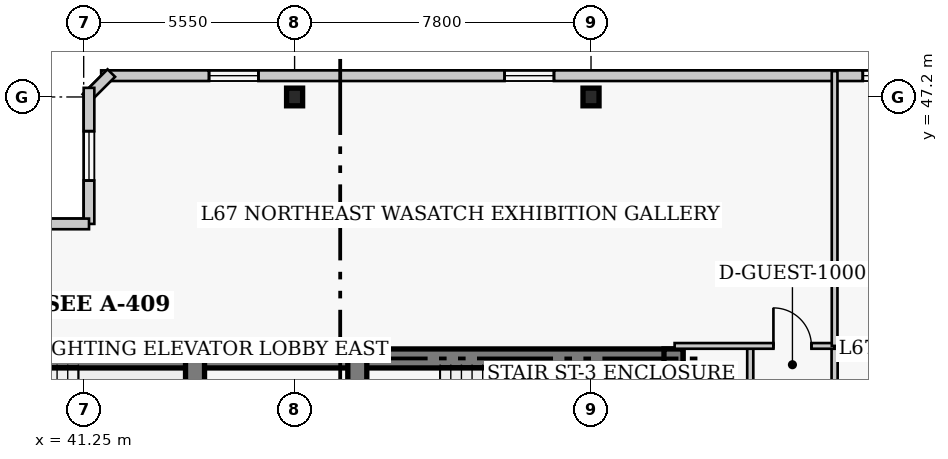
"""IFC4 building model, lengths in metres.
Left out: names, types, materials, properties, quantities, classifications, styles, units other than length and angle.
Written with IfcOpenShell. Run it as: python <this file> out.ifc"""

import sys

from ifc_helpers import new_model, si_unit, direction, frame, frame_2d, origin, origin_2d, place, context, subcontext, project, spatial, rectangle, i_section, extrude, element, fill, save


model = new_model("IFC4")
c1 = context("Model", 3, precision=1e-05, world=origin(), true_north=direction((0.0, 1.0)))
c2 = subcontext(c1, "Body", "Model", "MODEL_VIEW")
j1 = project(units=[si_unit("LENGTHUNIT", "METRE"), si_unit("PLANEANGLEUNIT", "RADIAN")], contexts=[c1])
p1 = place(None, origin())
s1 = spatial("IfcSite", under=j1, at=p1, CompositionType="ELEMENT")
p2 = place(p1, origin())
s2 = spatial("IfcBuilding", under=s1, at=p2, CompositionType="ELEMENT")
p3 = place(p2, frame((0.0, 0.0, 269.4)))
s3 = spatial("IfcBuildingStorey", under=s2, at=p3, CompositionType="ELEMENT", Elevation=269.4)
p4 = place(p3, frame((35.85, 40.32, 0.0), z_axis=(0.0, 0.0, 1.0), x_axis=(1.0, 0.0, 0.0)))
e1 = element("IfcWall", 1, at=p4, inside=s3, PredefinedType="SHEAR", context=c2, shape_type="SweptSolid", body=[
    extrude(rectangle(XDim=12.6, YDim=0.5, at=frame_2d((6.3, 0.0))), origin(), (0.0, 0.0, 1.0), 4.0),
])
p5 = place(p3, frame((48.45, 40.32, 0.0), z_axis=(0.0, 0.0, 1.0), x_axis=(1.0, 0.0, 0.0)))
e2 = element("IfcWall", 2, at=p5, inside=s3, PredefinedType="SHEAR", context=c2, shape_type="SweptSolid", body=[
    extrude(rectangle(XDim=8.57, YDim=0.5, at=frame_2d((4.285, 0.0))), origin(), (0.0, 0.0, 1.0), 4.0),
])
p6 = place(p3, frame((56.77, 27.05, 0.0), z_axis=(0.0, 0.0, 1.0), x_axis=(0.0, 1.0, 0.0)))
e3 = element("IfcWall", 3, at=p6, inside=s3, PredefinedType="SHEAR", context=c2, shape_type="SweptSolid", body=[
    extrude(rectangle(XDim=13.52, YDim=0.5, at=frame_2d((6.76, 0.0))), origin(), (0.0, 0.0, 1.0), 4.0),
])
p7 = place(p3, frame((44.18, 36.37, 0.0), z_axis=(0.0, 0.0, 1.0), x_axis=(0.0, 1.0, 0.0)))
e4 = element("IfcWall", 4, at=p7, inside=s3, PredefinedType="SHEAR", context=c2, shape_type="SweptSolid", body=[
    extrude(rectangle(XDim=3.95, YDim=0.5, at=frame_2d((1.975, 0.0))), origin(), (0.0, 0.0, 1.0), 4.0),
])
p8 = place(p3, frame((48.45, 32.5, 0.0), z_axis=(0.0, 0.0, 1.0), x_axis=(0.0, 1.0, 0.0)))
e5 = element("IfcWall", 5, at=p8, inside=s3, PredefinedType="SHEAR", context=c2, shape_type="SweptSolid", body=[
    extrude(rectangle(XDim=7.82, YDim=0.5, at=frame_2d((3.91, 0.0))), origin(), (0.0, 0.0, 1.0), 4.0),
])
p9 = place(p8, frame((5.7, 0.0, 0.0)))
e6 = element("IfcOpeningElement", 6, at=p9, cuts=e5, PredefinedType="OPENING", context=c2, shape_type="SweptSolid", body=[
    extrude(rectangle(XDim=1.1, YDim=2.15, at=frame_2d((0.55, 1.075))), frame((0.0, 0.26, 0.0), z_axis=(0.0, -1.0, 0.0), x_axis=(1.0, 0.0, 0.0)), (0.0, 0.0, 1.0), 0.52),
])
for number, where, z_axis, x_axis in (
    (7, (46.8, 47.2, 0.0), (0.0, 0.0, 1.0), (1.0, 0.0, 0.0)),
    (8, (54.6, 47.2, 0.0), (0.0, 0.0, 1.0), (1.0, 0.0, 0.0)),
):
    element("IfcColumn", number, at=place(p3, frame(where, z_axis=z_axis, x_axis=x_axis)), inside=s3, PredefinedType="COLUMN", context=c2, shape_type="SweptSolid", body=[
        extrude(i_section(OverallWidth=0.422, OverallDepth=0.465, WebThickness=0.045, FlangeThickness=0.073, FilletRadius=0.017, at=origin_2d()), origin(), (0.0, 0.0, 1.0), 4.0),
    ])
p10 = place(p3, frame((66.54, 47.76, 0.0), z_axis=(0.0, 0.0, 1.0), x_axis=(-1.0, 0.0, 0.0)))
e9 = element("IfcWall", 9, at=p10, inside=s3, PredefinedType="SOLIDWALL", context=c2, shape_type="SweptSolid", body=[
    extrude(rectangle(XDim=24.83, YDim=0.28, at=frame_2d((12.415, 0.0))), origin(), (0.0, 0.0, 1.0), 3.76),
])
p11 = place(p10, frame((3.488, 0.0, 0.85)))
e10 = element("IfcOpeningElement", 10, at=p11, cuts=e9, PredefinedType="OPENING", context=c2, shape_type="SweptSolid", body=[
    extrude(rectangle(XDim=1.3, YDim=1.7, at=frame_2d((0.65, 0.85))), frame((0.0, 0.15, 0.0), z_axis=(0.0, -1.0, 0.0), x_axis=(1.0, 0.0, 0.0)), (0.0, 0.0, 1.0), 0.3),
])
p12 = place(p10, frame((12.915, 0.0, 0.85)))
e11 = element("IfcOpeningElement", 11, at=p12, cuts=e9, PredefinedType="OPENING", context=c2, shape_type="SweptSolid", body=[
    extrude(rectangle(XDim=1.3, YDim=1.7, at=frame_2d((0.65, 0.85))), frame((0.0, 0.15, 0.0), z_axis=(0.0, -1.0, 0.0), x_axis=(1.0, 0.0, 0.0)), (0.0, 0.0, 1.0), 0.3),
])
p13 = place(p10, frame((20.692, 0.0, 0.85)))
e12 = element("IfcOpeningElement", 12, at=p13, cuts=e9, PredefinedType="OPENING", context=c2, shape_type="SweptSolid", body=[
    extrude(rectangle(XDim=1.3, YDim=1.7, at=frame_2d((0.65, 0.85))), frame((0.0, 0.15, 0.0), z_axis=(0.0, -1.0, 0.0), x_axis=(1.0, 0.0, 0.0)), (0.0, 0.0, 1.0), 0.3),
])
p14 = place(p3, frame((41.977, 47.829, 0.0), z_axis=(0.0, 0.0, 1.0), x_axis=(-0.706975312048, -0.707238225886, 0.0)))
e13 = element("IfcWall", 13, at=p14, inside=s3, PredefinedType="SOLIDWALL", context=c2, shape_type="SweptSolid", body=[
    extrude(rectangle(XDim=0.929, YDim=0.28, at=frame_2d((0.464, 0.0))), origin(), (0.0, 0.0, 1.0), 3.76),
])
p15 = place(p3, frame((41.39, 47.44, 0.0), z_axis=(0.0, 0.0, 1.0), x_axis=(0.0, -1.0, 0.0)))
e14 = element("IfcWall", 14, at=p15, inside=s3, PredefinedType="SOLIDWALL", context=c2, shape_type="SweptSolid", body=[
    extrude(rectangle(XDim=3.58, YDim=0.28, at=frame_2d((1.79, 0.0))), origin(), (0.0, 0.0, 1.0), 3.76),
])
p16 = place(p15, frame((1.14, 0.0, 0.85)))
e15 = element("IfcOpeningElement", 15, at=p16, cuts=e14, PredefinedType="OPENING", context=c2, shape_type="SweptSolid", body=[
    extrude(rectangle(XDim=1.3, YDim=1.7, at=frame_2d((0.65, 0.85))), frame((0.0, 0.15, 0.0), z_axis=(0.0, -1.0, 0.0), x_axis=(1.0, 0.0, 0.0)), (0.0, 0.0, 1.0), 0.3),
])
p17 = place(p3, frame((41.39, 43.86, 0.0), z_axis=(0.0, 0.0, 1.0), x_axis=(-1.0, 0.0, 0.0)))
e16 = element("IfcWall", 16, at=p17, inside=s3, PredefinedType="SOLIDWALL", context=c2, shape_type="SweptSolid", body=[
    extrude(rectangle(XDim=4.78, YDim=0.28, at=frame_2d((2.39, 0.0))), origin(), (0.0, 0.0, 1.0), 3.76),
])
p18 = place(p17, frame((1.74, 0.0, 0.85)))
e17 = element("IfcOpeningElement", 17, at=p18, cuts=e16, PredefinedType="OPENING", context=c2, shape_type="SweptSolid", body=[
    extrude(rectangle(XDim=1.3, YDim=1.7, at=frame_2d((0.65, 0.85))), frame((0.0, 0.15, 0.0), z_axis=(0.0, -1.0, 0.0), x_axis=(1.0, 0.0, 0.0)), (0.0, 0.0, 1.0), 0.3),
])
p19 = place(p3, frame((61.01, 22.55, 0.0), z_axis=(0.0, 0.0, 1.0), x_axis=(0.0, 1.0, 0.0)))
e18 = element("IfcWall", 18, at=p19, inside=s3, PredefinedType="PARTITIONING", context=c2, shape_type="SweptSolid", body=[
    extrude(rectangle(XDim=18.1, YDim=0.16, at=frame_2d((9.05, 0.0))), origin(), (0.0, 0.0, 1.0), 3.76),
])
p20 = place(p19, frame((2.65, 0.0, 0.0)))
e19 = element("IfcOpeningElement", 19, at=p20, cuts=e18, PredefinedType="OPENING", context=c2, shape_type="SweptSolid", body=[
    extrude(rectangle(XDim=0.95, YDim=2.1, at=frame_2d((0.475, 1.05))), frame((0.0, 0.09, 0.0), z_axis=(0.0, -1.0, 0.0), x_axis=(1.0, 0.0, 0.0)), (0.0, 0.0, 1.0), 0.18),
])
p21 = place(p19, frame((9.175, 0.0, 0.0)))
e20 = element("IfcOpeningElement", 20, at=p21, cuts=e18, PredefinedType="OPENING", context=c2, shape_type="SweptSolid", body=[
    extrude(rectangle(XDim=0.95, YDim=2.1, at=frame_2d((0.475, 1.05))), frame((0.0, 0.09, 0.0), z_axis=(0.0, -1.0, 0.0), x_axis=(1.0, 0.0, 0.0)), (0.0, 0.0, 1.0), 0.18),
])
p22 = place(p19, frame((13.6, 0.0, 0.0)))
e21 = element("IfcOpeningElement", 21, at=p22, cuts=e18, PredefinedType="OPENING", context=c2, shape_type="SweptSolid", body=[
    extrude(rectangle(XDim=1.0, YDim=2.15, at=frame_2d((0.5, 1.075))), frame((0.0, 0.09, 0.0), z_axis=(0.0, -1.0, 0.0), x_axis=(1.0, 0.0, 0.0)), (0.0, 0.0, 1.0), 0.18),
])
p23 = place(p3, frame((58.79, 24.71, 0.0), z_axis=(0.0, 0.0, 1.0), x_axis=(0.0, 1.0, 0.0)))
e22 = element("IfcWall", 22, at=p23, inside=s3, PredefinedType="PARTITIONING", context=c2, shape_type="SweptSolid", body=[
    extrude(rectangle(XDim=15.94, YDim=0.16, at=frame_2d((7.97, 0.0))), origin(), (0.0, 0.0, 1.0), 3.76),
])
p24 = place(p3, frame((56.8, 40.65, 0.0), z_axis=(0.0, 0.0, 1.0), x_axis=(1.0, 0.0, 0.0)))
e23 = element("IfcWall", 23, at=p24, inside=s3, PredefinedType="PARTITIONING", context=c2, shape_type="SweptSolid", body=[
    extrude(rectangle(XDim=4.21, YDim=0.15, at=frame_2d((2.105, 0.0))), origin(), (0.0, 0.0, 1.0), 3.76),
])
p25 = place(p24, frame((2.6, 0.0, 0.0)))
e24 = element("IfcOpeningElement", 24, at=p25, cuts=e23, PredefinedType="OPENING", context=c2, shape_type="SweptSolid", body=[
    extrude(rectangle(XDim=1.0, YDim=2.15, at=frame_2d((0.5, 1.075))), frame((0.0, 0.085, 0.0), z_axis=(0.0, -1.0, 0.0), x_axis=(1.0, 0.0, 0.0)), (0.0, 0.0, 1.0), 0.17),
])
p26 = place(p3, frame((61.01, 40.65, 0.0), z_axis=(0.0, 0.0, 1.0), x_axis=(0.0, 1.0, 0.0)))
e25 = element("IfcWall", 25, at=p26, inside=s3, PredefinedType="PARTITIONING", context=c2, shape_type="SweptSolid", body=[
    extrude(rectangle(XDim=7.23, YDim=0.15, at=frame_2d((3.615, 0.0))), origin(), (0.0, 0.0, 1.0), 3.76),
])
p27 = place(p11, origin())
e26 = element("IfcWindow", 26, at=p27, inside=s3, PartitioningType="SINGLE_PANEL", PredefinedType="WINDOW", context=c2, shape_type="SweptSolid", body=[
    extrude(rectangle(XDim=1.3, YDim=1.7, at=frame_2d((0.65, 0.85))), frame((0.0, 0.03, 0.0), z_axis=(0.0, -1.0, 0.0), x_axis=(1.0, 0.0, 0.0)), (0.0, 0.0, 1.0), 0.06),
])
fill(e10, e26)
p28 = place(p12, origin())
e27 = element("IfcWindow", 27, at=p28, inside=s3, PartitioningType="SINGLE_PANEL", PredefinedType="WINDOW", context=c2, shape_type="SweptSolid", body=[
    extrude(rectangle(XDim=1.3, YDim=1.7, at=frame_2d((0.65, 0.85))), frame((0.0, 0.03, 0.0), z_axis=(0.0, -1.0, 0.0), x_axis=(1.0, 0.0, 0.0)), (0.0, 0.0, 1.0), 0.06),
])
fill(e11, e27)
p29 = place(p13, origin())
e28 = element("IfcWindow", 28, at=p29, inside=s3, PartitioningType="SINGLE_PANEL", PredefinedType="WINDOW", context=c2, shape_type="SweptSolid", body=[
    extrude(rectangle(XDim=1.3, YDim=1.7, at=frame_2d((0.65, 0.85))), frame((0.0, 0.03, 0.0), z_axis=(0.0, -1.0, 0.0), x_axis=(1.0, 0.0, 0.0)), (0.0, 0.0, 1.0), 0.06),
])
fill(e12, e28)
p30 = place(p16, origin())
e29 = element("IfcWindow", 29, at=p30, inside=s3, PartitioningType="SINGLE_PANEL", PredefinedType="WINDOW", context=c2, shape_type="SweptSolid", body=[
    extrude(rectangle(XDim=1.3, YDim=1.7, at=frame_2d((0.65, 0.85))), frame((0.0, 0.03, 0.0), z_axis=(0.0, -1.0, 0.0), x_axis=(1.0, 0.0, 0.0)), (0.0, 0.0, 1.0), 0.06),
])
fill(e15, e29)
p31 = place(p25, origin())
e30 = element("IfcDoor", 30, at=p31, inside=s3, OperationType="SINGLE_SWING_LEFT", PredefinedType="DOOR", context=c2, shape_type="SweptSolid", body=[
    extrude(rectangle(XDim=1.0, YDim=2.15, at=frame_2d((0.5, 1.075))), frame((0.0, 0.025, 0.0), z_axis=(0.0, -1.0, 0.0), x_axis=(1.0, 0.0, 0.0)), (0.0, 0.0, 1.0), 0.05),
])
fill(e24, e30)
save(model, sys.argv[1])
